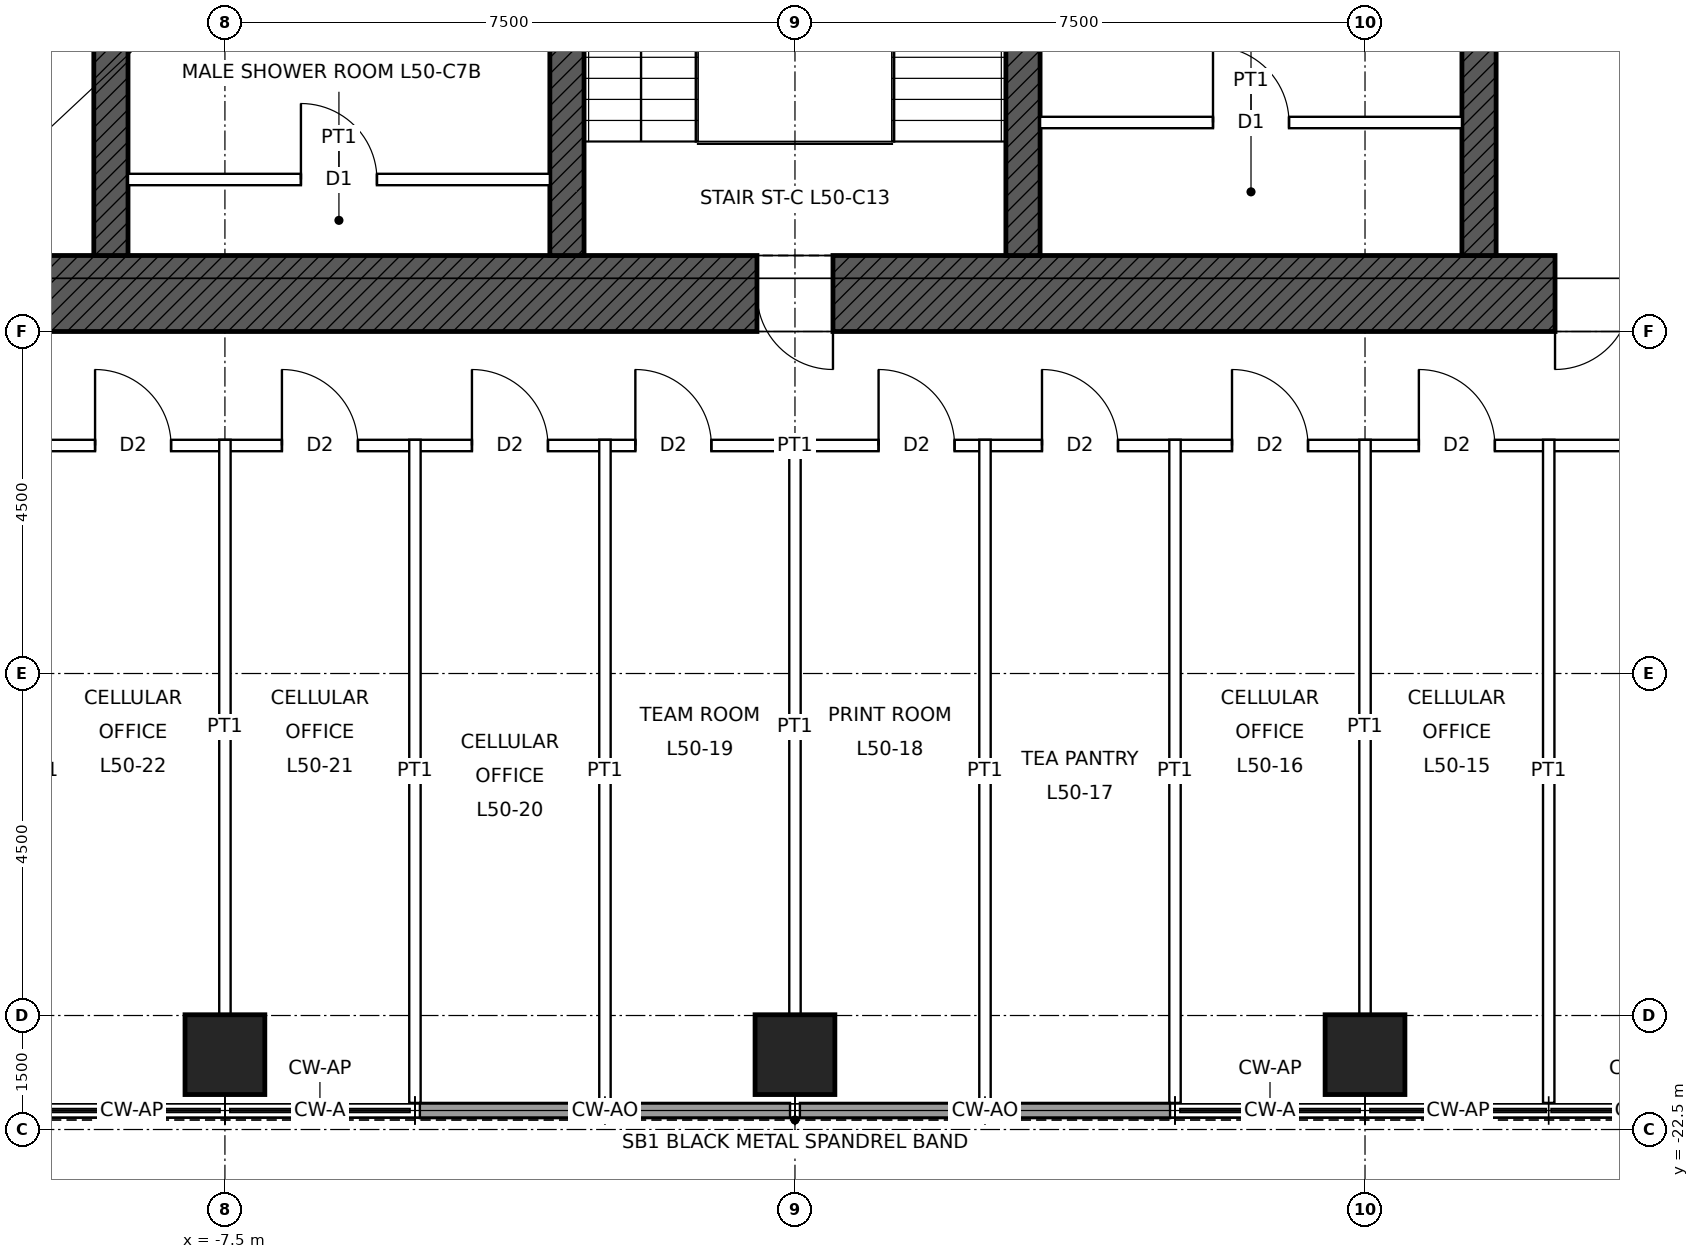
"""IFC4 building model, lengths in metres.
Left out: names, types, materials, properties, quantities, classifications, styles, units other than length and angle.
Written with IfcOpenShell. Run it as: python <this file> out.ifc"""

import sys

from ifc_helpers import new_model, si_unit, direction, frame, frame_2d, origin, origin_2d, place, context, subcontext, project, spatial, rectangle, hollow_rectangle, extrude, element, fill, save


model = new_model("IFC4")
c1 = context("Model", 3, precision=1e-05, world=origin(), true_north=direction((0.0, 1.0)))
c2 = subcontext(c1, "Body", "Model", "MODEL_VIEW")
j1 = project(units=[si_unit("LENGTHUNIT", "METRE"), si_unit("PLANEANGLEUNIT", "RADIAN")], contexts=[c1])
p1 = place(None, origin())
s1 = spatial("IfcSite", under=j1, at=p1, CompositionType="ELEMENT")
p2 = place(p1, origin())
s2 = spatial("IfcBuilding", under=s1, at=p2, CompositionType="ELEMENT")
p3 = place(p2, frame((0.0, 0.0, 233.9)))
s3 = spatial("IfcBuildingStorey", under=s2, at=p3, CompositionType="ELEMENT", Elevation=233.9)
for number, where, z_axis, x_axis in (
    (1, (7.5, -21.515, 0.0), (0.0, 0.0, 1.0), (1.0, 0.0, 0.0)),
    (2, (0.0, -21.515, 0.0), (0.0, 0.0, 1.0), (1.0, 0.0, 0.0)),
    (3, (-7.5, -21.515, 0.0), (0.0, 0.0, 1.0), (1.0, 0.0, 0.0)),
):
    element("IfcColumn", number, at=place(p3, frame(where, z_axis=z_axis, x_axis=x_axis)), inside=s3, PredefinedType="COLUMN", context=c2, shape_type="SweptSolid", body=[
        extrude(hollow_rectangle(XDim=1.05, YDim=1.05, WallThickness=0.07, at=origin_2d()), origin(), (0.0, 0.0, 1.0), 4.0),
    ])
p4 = place(p3, frame((12.0, -11.5, 0.0), z_axis=(0.0, 0.0, 1.0), x_axis=(-1.0, 0.0, 0.0)))
e4 = element("IfcWall", 4, at=p4, inside=s3, PredefinedType="SHEAR", context=c2, shape_type="SweptSolid", body=[
    extrude(rectangle(XDim=24.0, YDim=1.0, at=frame_2d((12.0, 0.0))), origin(), (0.0, 0.0, 1.0), 4.0),
])
p5 = place(p4, frame((11.5, 0.0, 0.0)))
e5 = element("IfcOpeningElement", 5, at=p5, cuts=e4, PredefinedType="OPENING", context=c2, shape_type="SweptSolid", body=[
    extrude(rectangle(XDim=1.0, YDim=2.1, at=frame_2d((0.5, 1.05))), frame((0.0, 0.51, 0.0), z_axis=(0.0, -1.0, 0.0), x_axis=(1.0, 0.0, 0.0)), (0.0, 0.0, 1.0), 1.02),
])
p6 = place(p4, frame((1.0, 0.0, 0.0)))
e6 = element("IfcOpeningElement", 6, at=p6, cuts=e4, PredefinedType="OPENING", context=c2, shape_type="SweptSolid", body=[
    extrude(rectangle(XDim=1.0, YDim=2.4, at=frame_2d((0.5, 1.2))), frame((0.0, 0.51, 0.0), z_axis=(0.0, -1.0, 0.0), x_axis=(1.0, 0.0, 0.0)), (0.0, 0.0, 1.0), 1.02),
])
p7 = place(p3, frame((-9.0, -11.0, 0.0), z_axis=(0.0, 0.0, 1.0), x_axis=(0.0, 1.0, 0.0)))
e7 = element("IfcWall", 7, at=p7, inside=s3, PredefinedType="SHEAR", context=c2, shape_type="SweptSolid", body=[
    extrude(rectangle(XDim=6.5, YDim=0.45, at=frame_2d((3.25, 0.0))), origin(), (0.0, 0.0, 1.0), 4.0),
])
p8 = place(p7, frame((4.25, 0.0, 0.0)))
e8 = element("IfcOpeningElement", 8, at=p8, cuts=e7, PredefinedType="OPENING", context=c2, shape_type="SweptSolid", body=[
    extrude(rectangle(XDim=1.0, YDim=2.1, at=frame_2d((0.5, 1.05))), frame((0.0, 0.235, 0.0), z_axis=(0.0, -1.0, 0.0), x_axis=(1.0, 0.0, 0.0)), (0.0, 0.0, 1.0), 0.47),
])
p9 = place(p3, frame((9.0, -11.0, 0.0), z_axis=(0.0, 0.0, 1.0), x_axis=(0.0, 1.0, 0.0)))
e9 = element("IfcWall", 9, at=p9, inside=s3, PredefinedType="SHEAR", context=c2, shape_type="SweptSolid", body=[
    extrude(rectangle(XDim=6.5, YDim=0.45, at=frame_2d((3.25, 0.0))), origin(), (0.0, 0.0, 1.0), 4.0),
])
p10 = place(p9, frame((4.25, 0.0, 0.0)))
e10 = element("IfcOpeningElement", 10, at=p10, cuts=e9, PredefinedType="OPENING", context=c2, shape_type="SweptSolid", body=[
    extrude(rectangle(XDim=1.0, YDim=2.1, at=frame_2d((0.5, 1.05))), frame((0.0, 0.235, 0.0), z_axis=(0.0, -1.0, 0.0), x_axis=(1.0, 0.0, 0.0)), (0.0, 0.0, 1.0), 0.47),
])
for number, where, z_axis, x_axis in (
    (11, (-3.0, -11.0, 0.0), (0.0, 0.0, 1.0), (0.0, 1.0, 0.0)),
    (12, (3.0, -11.0, 0.0), (0.0, 0.0, 1.0), (0.0, 1.0, 0.0)),
):
    element("IfcWall", number, at=place(p3, frame(where, z_axis=z_axis, x_axis=x_axis)), inside=s3, PredefinedType="SHEAR", context=c2, shape_type="SweptSolid", body=[
        extrude(rectangle(XDim=6.5, YDim=0.45, at=frame_2d((3.25, 0.0))), origin(), (0.0, 0.0, 1.0), 4.0),
    ])
for number, where, z_axis, x_axis in (
    (13, (4.935, -22.25, 0.0), (0.0, 0.0, 1.0), (-1.0, 0.0, 0.0)),
    (14, (2.468, -22.25, 0.0), (0.0, 0.0, 1.0), (-1.0, 0.0, 0.0)),
    (15, (-0.065, -22.25, 0.0), (0.0, 0.0, 1.0), (-1.0, 0.0, 0.0)),
    (16, (-2.532, -22.25, 0.0), (0.0, 0.0, 1.0), (-1.0, 0.0, 0.0)),
):
    element("IfcWall", number, at=place(p3, frame(where, z_axis=z_axis, x_axis=x_axis)), inside=s3, PredefinedType="SOLIDWALL", context=c2, shape_type="SweptSolid", body=[
        extrude(rectangle(XDim=2.403, YDim=0.2, at=frame_2d((1.201, 0.0))), origin(), (0.0, 0.0, 1.0), 3.85),
    ])
p11 = place(p3, frame((-13.575, -13.5, 0.0), z_axis=(0.0, 0.0, 1.0), x_axis=(1.0, 0.0, 0.0)))
e17 = element("IfcWall", 17, at=p11, inside=s3, PredefinedType="PARTITIONING", context=c2, shape_type="SweptSolid", body=[
    extrude(rectangle(XDim=27.15, YDim=0.15, at=frame_2d((13.575, 0.0))), origin(), (0.0, 0.0, 1.0), 3.85),
])
p12 = place(p11, frame((21.783, 0.0, 0.0)))
e18 = element("IfcOpeningElement", 18, at=p12, cuts=e17, PredefinedType="OPENING", context=c2, shape_type="SweptSolid", body=[
    extrude(rectangle(XDim=1.0, YDim=2.1, at=frame_2d((0.5, 1.05))), frame((0.0, 0.085, 0.0), z_axis=(0.0, -1.0, 0.0), x_axis=(1.0, 0.0, 0.0)), (0.0, 0.0, 1.0), 0.17),
])
p13 = place(p11, frame((19.325, 0.0, 0.0)))
e19 = element("IfcOpeningElement", 19, at=p13, cuts=e17, PredefinedType="OPENING", context=c2, shape_type="SweptSolid", body=[
    extrude(rectangle(XDim=1.0, YDim=2.1, at=frame_2d((0.5, 1.05))), frame((0.0, 0.085, 0.0), z_axis=(0.0, -1.0, 0.0), x_axis=(1.0, 0.0, 0.0)), (0.0, 0.0, 1.0), 0.17),
])
p14 = place(p11, frame((16.825, 0.0, 0.0)))
e20 = element("IfcOpeningElement", 20, at=p14, cuts=e17, PredefinedType="OPENING", context=c2, shape_type="SweptSolid", body=[
    extrude(rectangle(XDim=1.0, YDim=2.1, at=frame_2d((0.5, 1.05))), frame((0.0, 0.085, 0.0), z_axis=(0.0, -1.0, 0.0), x_axis=(1.0, 0.0, 0.0)), (0.0, 0.0, 1.0), 0.17),
])
p15 = place(p11, frame((14.675, 0.0, 0.0)))
e21 = element("IfcOpeningElement", 21, at=p15, cuts=e17, PredefinedType="OPENING", context=c2, shape_type="SweptSolid", body=[
    extrude(rectangle(XDim=1.0, YDim=2.1, at=frame_2d((0.5, 1.05))), frame((0.0, 0.085, 0.0), z_axis=(0.0, -1.0, 0.0), x_axis=(1.0, 0.0, 0.0)), (0.0, 0.0, 1.0), 0.17),
])
p16 = place(p11, frame((11.475, 0.0, 0.0)))
e22 = element("IfcOpeningElement", 22, at=p16, cuts=e17, PredefinedType="OPENING", context=c2, shape_type="SweptSolid", body=[
    extrude(rectangle(XDim=1.0, YDim=2.1, at=frame_2d((0.5, 1.05))), frame((0.0, 0.085, 0.0), z_axis=(0.0, -1.0, 0.0), x_axis=(1.0, 0.0, 0.0)), (0.0, 0.0, 1.0), 0.17),
])
p17 = place(p11, frame((9.325, 0.0, 0.0)))
e23 = element("IfcOpeningElement", 23, at=p17, cuts=e17, PredefinedType="OPENING", context=c2, shape_type="SweptSolid", body=[
    extrude(rectangle(XDim=1.0, YDim=2.1, at=frame_2d((0.5, 1.05))), frame((0.0, 0.085, 0.0), z_axis=(0.0, -1.0, 0.0), x_axis=(1.0, 0.0, 0.0)), (0.0, 0.0, 1.0), 0.17),
])
p18 = place(p11, frame((6.825, 0.0, 0.0)))
e24 = element("IfcOpeningElement", 24, at=p18, cuts=e17, PredefinedType="OPENING", context=c2, shape_type="SweptSolid", body=[
    extrude(rectangle(XDim=1.0, YDim=2.1, at=frame_2d((0.5, 1.05))), frame((0.0, 0.085, 0.0), z_axis=(0.0, -1.0, 0.0), x_axis=(1.0, 0.0, 0.0)), (0.0, 0.0, 1.0), 0.17),
])
p19 = place(p11, frame((4.366, 0.0, 0.0)))
e25 = element("IfcOpeningElement", 25, at=p19, cuts=e17, PredefinedType="OPENING", context=c2, shape_type="SweptSolid", body=[
    extrude(rectangle(XDim=1.0, YDim=2.1, at=frame_2d((0.5, 1.05))), frame((0.0, 0.085, 0.0), z_axis=(0.0, -1.0, 0.0), x_axis=(1.0, 0.0, 0.0)), (0.0, 0.0, 1.0), 0.17),
])
p20 = place(p11, frame((25.318, 0.0, 0.0)))
e26 = element("IfcOpeningElement", 26, at=p20, cuts=e17, PredefinedType="OPENING", context=c2, shape_type="SweptSolid", body=[
    extrude(rectangle(XDim=1.0, YDim=2.4, at=frame_2d((0.5, 1.2))), frame((0.0, 0.085, 0.0), z_axis=(0.0, -1.0, 0.0), x_axis=(1.0, 0.0, 0.0)), (0.0, 0.0, 1.0), 0.17),
])
p21 = place(p11, frame((1.366, 0.0, 0.0)))
e27 = element("IfcOpeningElement", 27, at=p21, cuts=e17, PredefinedType="OPENING", context=c2, shape_type="SweptSolid", body=[
    extrude(rectangle(XDim=1.0, YDim=2.4, at=frame_2d((0.5, 1.2))), frame((0.0, 0.085, 0.0), z_axis=(0.0, -1.0, 0.0), x_axis=(1.0, 0.0, 0.0)), (0.0, 0.0, 1.0), 0.17),
])
p22 = place(p3, frame((-7.5, -20.99, 0.0), z_axis=(0.0, 0.0, 1.0), x_axis=(0.0, 1.0, 0.0)))
e28 = element("IfcWall", 28, at=p22, inside=s3, PredefinedType="PARTITIONING", context=c2, shape_type="SweptSolid", body=[
    extrude(rectangle(XDim=7.565, YDim=0.15, at=frame_2d((3.782, 0.0))), origin(), (0.0, 0.0, 1.0), 3.238),
])
for number, where, z_axis, x_axis in (
    (29, (-5.0, -22.15, 0.0), (0.0, 0.0, 1.0), (0.0, 1.0, 0.0)),
    (30, (-2.5, -22.15, 0.0), (0.0, 0.0, 1.0), (0.0, 1.0, 0.0)),
):
    element("IfcWall", number, at=place(p3, frame(where, z_axis=z_axis, x_axis=x_axis)), inside=s3, PredefinedType="PARTITIONING", context=c2, shape_type="SweptSolid", body=[
        extrude(rectangle(XDim=8.725, YDim=0.15, at=frame_2d((4.362, 0.0))), origin(), (0.0, 0.0, 1.0), 3.85),
    ])
p23 = place(p3, frame((0.0, -20.99, 0.0), z_axis=(0.0, 0.0, 1.0), x_axis=(0.0, 1.0, 0.0)))
e31 = element("IfcWall", 31, at=p23, inside=s3, PredefinedType="PARTITIONING", context=c2, shape_type="SweptSolid", body=[
    extrude(rectangle(XDim=7.565, YDim=0.15, at=frame_2d((3.782, 0.0))), origin(), (0.0, 0.0, 1.0), 3.238),
])
for number, where, z_axis, x_axis in (
    (32, (2.5, -22.15, 0.0), (0.0, 0.0, 1.0), (0.0, 1.0, 0.0)),
    (33, (5.0, -22.15, 0.0), (0.0, 0.0, 1.0), (0.0, 1.0, 0.0)),
):
    element("IfcWall", number, at=place(p3, frame(where, z_axis=z_axis, x_axis=x_axis)), inside=s3, PredefinedType="PARTITIONING", context=c2, shape_type="SweptSolid", body=[
        extrude(rectangle(XDim=8.725, YDim=0.15, at=frame_2d((4.362, 0.0))), origin(), (0.0, 0.0, 1.0), 3.85),
    ])
p24 = place(p3, frame((7.5, -20.99, 0.0), z_axis=(0.0, 0.0, 1.0), x_axis=(0.0, 1.0, 0.0)))
e34 = element("IfcWall", 34, at=p24, inside=s3, PredefinedType="PARTITIONING", context=c2, shape_type="SweptSolid", body=[
    extrude(rectangle(XDim=7.565, YDim=0.15, at=frame_2d((3.782, 0.0))), origin(), (0.0, 0.0, 1.0), 3.238),
])
p25 = place(p3, frame((9.917, -22.15, 0.0), z_axis=(0.0, 0.0, 1.0), x_axis=(0.0, 1.0, 0.0)))
e35 = element("IfcWall", 35, at=p25, inside=s3, PredefinedType="PARTITIONING", context=c2, shape_type="SweptSolid", body=[
    extrude(rectangle(XDim=8.725, YDim=0.15, at=frame_2d((4.362, 0.0))), origin(), (0.0, 0.0, 1.0), 3.85),
])
p26 = place(p3, frame((-8.775, -10.0, 0.0), z_axis=(0.0, 0.0, 1.0), x_axis=(1.0, 0.0, 0.0)))
e36 = element("IfcWall", 36, at=p26, inside=s3, PredefinedType="PARTITIONING", context=c2, shape_type="SweptSolid", body=[
    extrude(rectangle(XDim=5.55, YDim=0.15, at=frame_2d((2.775, 0.0))), origin(), (0.0, 0.0, 1.0), 3.75),
])
p27 = place(p26, frame((2.275, 0.0, 0.0)))
e37 = element("IfcOpeningElement", 37, at=p27, cuts=e36, PredefinedType="OPENING", context=c2, shape_type="SweptSolid", body=[
    extrude(rectangle(XDim=1.0, YDim=2.1, at=frame_2d((0.5, 1.05))), frame((0.0, 0.085, 0.0), z_axis=(0.0, -1.0, 0.0), x_axis=(1.0, 0.0, 0.0)), (0.0, 0.0, 1.0), 0.17),
])
p28 = place(p3, frame((3.225, -9.25, 0.0), z_axis=(0.0, 0.0, 1.0), x_axis=(1.0, 0.0, 0.0)))
e38 = element("IfcWall", 38, at=p28, inside=s3, PredefinedType="PARTITIONING", context=c2, shape_type="SweptSolid", body=[
    extrude(rectangle(XDim=5.55, YDim=0.15, at=frame_2d((2.775, 0.0))), origin(), (0.0, 0.0, 1.0), 3.75),
])
p29 = place(p28, frame((2.275, 0.0, 0.0)))
e39 = element("IfcOpeningElement", 39, at=p29, cuts=e38, PredefinedType="OPENING", context=c2, shape_type="SweptSolid", body=[
    extrude(rectangle(XDim=1.0, YDim=2.1, at=frame_2d((0.5, 1.05))), frame((0.0, 0.085, 0.0), z_axis=(0.0, -1.0, 0.0), x_axis=(1.0, 0.0, 0.0)), (0.0, 0.0, 1.0), 0.17),
])
p30 = place(p5, origin())
e40 = element("IfcDoor", 40, at=p30, inside=s3, OperationType="SINGLE_SWING_LEFT", PredefinedType="DOOR", context=c2, shape_type="SweptSolid", body=[
    extrude(rectangle(XDim=1.0, YDim=2.1, at=frame_2d((0.5, 1.05))), frame((0.0, 0.485, 0.0), z_axis=(0.0, -1.0, 0.0), x_axis=(1.0, 0.0, 0.0)), (0.0, 0.0, 1.0), 0.05),
])
fill(e5, e40)
p31 = place(p6, origin())
e41 = element("IfcDoor", 41, at=p31, inside=s3, OperationType="SINGLE_SWING_RIGHT", PredefinedType="DOOR", context=c2, shape_type="SweptSolid", body=[
    extrude(rectangle(XDim=1.0, YDim=2.4, at=frame_2d((0.5, 1.2))), frame((0.0, 0.485, 0.0), z_axis=(0.0, -1.0, 0.0), x_axis=(1.0, 0.0, 0.0)), (0.0, 0.0, 1.0), 0.05),
])
fill(e6, e41)
p32 = place(p27, origin())
e42 = element("IfcDoor", 42, at=p32, inside=s3, OperationType="SINGLE_SWING_LEFT", PredefinedType="DOOR", context=c2, shape_type="SweptSolid", body=[
    extrude(rectangle(XDim=1.0, YDim=2.1, at=frame_2d((0.5, 1.05))), frame((0.0, 0.025, 0.0), z_axis=(0.0, -1.0, 0.0), x_axis=(1.0, 0.0, 0.0)), (0.0, 0.0, 1.0), 0.05),
])
fill(e37, e42)
p33 = place(p29, origin())
e43 = element("IfcDoor", 43, at=p33, inside=s3, OperationType="SINGLE_SWING_LEFT", PredefinedType="DOOR", context=c2, shape_type="SweptSolid", body=[
    extrude(rectangle(XDim=1.0, YDim=2.1, at=frame_2d((0.5, 1.05))), frame((0.0, 0.025, 0.0), z_axis=(0.0, -1.0, 0.0), x_axis=(1.0, 0.0, 0.0)), (0.0, 0.0, 1.0), 0.05),
])
fill(e39, e43)
p34 = place(p12, origin())
e44 = element("IfcDoor", 44, at=p34, inside=s3, OperationType="SINGLE_SWING_LEFT", PredefinedType="DOOR", context=c2, shape_type="SweptSolid", body=[
    extrude(rectangle(XDim=1.0, YDim=2.1, at=frame_2d((0.5, 1.05))), frame((0.0, 0.025, 0.0), z_axis=(0.0, -1.0, 0.0), x_axis=(1.0, 0.0, 0.0)), (0.0, 0.0, 1.0), 0.05),
])
fill(e18, e44)
p35 = place(p13, origin())
e45 = element("IfcDoor", 45, at=p35, inside=s3, OperationType="SINGLE_SWING_LEFT", PredefinedType="DOOR", context=c2, shape_type="SweptSolid", body=[
    extrude(rectangle(XDim=1.0, YDim=2.1, at=frame_2d((0.5, 1.05))), frame((0.0, 0.025, 0.0), z_axis=(0.0, -1.0, 0.0), x_axis=(1.0, 0.0, 0.0)), (0.0, 0.0, 1.0), 0.05),
])
fill(e19, e45)
p36 = place(p14, origin())
e46 = element("IfcDoor", 46, at=p36, inside=s3, OperationType="SINGLE_SWING_LEFT", PredefinedType="DOOR", context=c2, shape_type="SweptSolid", body=[
    extrude(rectangle(XDim=1.0, YDim=2.1, at=frame_2d((0.5, 1.05))), frame((0.0, 0.025, 0.0), z_axis=(0.0, -1.0, 0.0), x_axis=(1.0, 0.0, 0.0)), (0.0, 0.0, 1.0), 0.05),
])
fill(e20, e46)
p37 = place(p15, origin())
e47 = element("IfcDoor", 47, at=p37, inside=s3, OperationType="SINGLE_SWING_LEFT", PredefinedType="DOOR", context=c2, shape_type="SweptSolid", body=[
    extrude(rectangle(XDim=1.0, YDim=2.1, at=frame_2d((0.5, 1.05))), frame((0.0, 0.025, 0.0), z_axis=(0.0, -1.0, 0.0), x_axis=(1.0, 0.0, 0.0)), (0.0, 0.0, 1.0), 0.05),
])
fill(e21, e47)
p38 = place(p16, origin())
e48 = element("IfcDoor", 48, at=p38, inside=s3, OperationType="SINGLE_SWING_LEFT", PredefinedType="DOOR", context=c2, shape_type="SweptSolid", body=[
    extrude(rectangle(XDim=1.0, YDim=2.1, at=frame_2d((0.5, 1.05))), frame((0.0, 0.025, 0.0), z_axis=(0.0, -1.0, 0.0), x_axis=(1.0, 0.0, 0.0)), (0.0, 0.0, 1.0), 0.05),
])
fill(e22, e48)
p39 = place(p17, origin())
e49 = element("IfcDoor", 49, at=p39, inside=s3, OperationType="SINGLE_SWING_LEFT", PredefinedType="DOOR", context=c2, shape_type="SweptSolid", body=[
    extrude(rectangle(XDim=1.0, YDim=2.1, at=frame_2d((0.5, 1.05))), frame((0.0, 0.025, 0.0), z_axis=(0.0, -1.0, 0.0), x_axis=(1.0, 0.0, 0.0)), (0.0, 0.0, 1.0), 0.05),
])
fill(e23, e49)
p40 = place(p18, origin())
e50 = element("IfcDoor", 50, at=p40, inside=s3, OperationType="SINGLE_SWING_LEFT", PredefinedType="DOOR", context=c2, shape_type="SweptSolid", body=[
    extrude(rectangle(XDim=1.0, YDim=2.1, at=frame_2d((0.5, 1.05))), frame((0.0, 0.025, 0.0), z_axis=(0.0, -1.0, 0.0), x_axis=(1.0, 0.0, 0.0)), (0.0, 0.0, 1.0), 0.05),
])
fill(e24, e50)
p41 = place(p19, origin())
e51 = element("IfcDoor", 51, at=p41, inside=s3, OperationType="SINGLE_SWING_LEFT", PredefinedType="DOOR", context=c2, shape_type="SweptSolid", body=[
    extrude(rectangle(XDim=1.0, YDim=2.1, at=frame_2d((0.5, 1.05))), frame((0.0, 0.025, 0.0), z_axis=(0.0, -1.0, 0.0), x_axis=(1.0, 0.0, 0.0)), (0.0, 0.0, 1.0), 0.05),
])
fill(e25, e51)
save(model, sys.argv[1])
